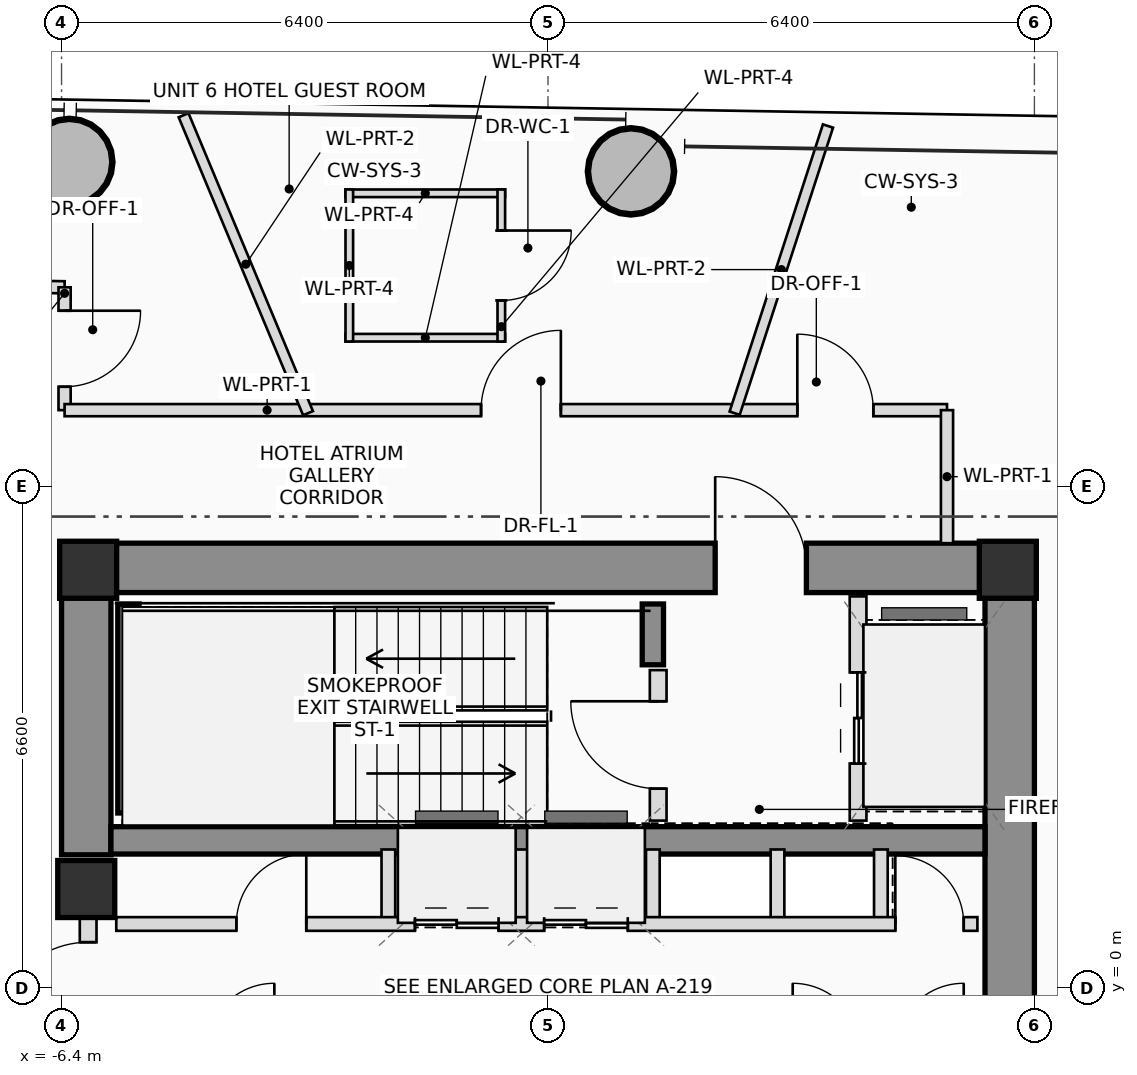
"""IFC4 building model, lengths in metres.
Left out: names, types, materials, properties, quantities, classifications, styles, units other than length and angle.
Written with IfcOpenShell. Run it as: python <this file> out.ifc"""

import sys

from ifc_helpers import new_model, si_unit, direction, frame, frame_2d, origin, origin_2d, place, context, subcontext, project, spatial, rectangle, hollow_circle, extrude, source, transform, mapped, element, fill, save


model = new_model("IFC4")
c1 = context("Model", 3, precision=1e-05, world=origin(), true_north=direction((0.0, 1.0)))
c2 = subcontext(c1, "Body", "Model", "MODEL_VIEW")
j1 = project(units=[si_unit("LENGTHUNIT", "METRE"), si_unit("PLANEANGLEUNIT", "RADIAN")], contexts=[c1])
p1 = place(None, origin())
s1 = spatial("IfcSite", under=j1, at=p1, CompositionType="ELEMENT")
p2 = place(p1, origin())
s2 = spatial("IfcBuilding", under=s1, at=p2, CompositionType="ELEMENT")
p3 = place(p2, frame((0.0, 0.0, 212.15)))
s3 = spatial("IfcBuildingStorey", under=s2, at=p3, CompositionType="ELEMENT", Elevation=212.15)
m1 = source(origin(), c2, "Body", "SweptSolid", [
    extrude(rectangle(XDim=0.75, YDim=0.75, at=origin_2d()), origin(), (0.0, 0.0, 1.0), 3.45),
])
for number, where, z_axis, x_axis in (
    (1, (6.05, 5.5, 0.0), (0.0, 0.0, 1.0), (1.0, 0.0, 0.0)),
    (2, (-6.05, 5.5, 0.0), (0.0, 0.0, 1.0), (1.0, 0.0, 0.0)),
):
    element("IfcColumn", number, at=place(p3, frame(where, z_axis=z_axis, x_axis=x_axis)), inside=s3, PredefinedType="COLUMN", context=c2, shape_type="MappedRepresentation", body=[
        mapped(m1, transform((0.0, 0.0, 0.0), scale=1.0)),
    ])
p4 = place(p3, frame((-6.4, 5.525, 0.0), z_axis=(0.0, 0.0, 1.0), x_axis=(1.0, 0.0, 0.0)))
e3 = element("IfcWall", 3, at=p4, inside=s3, PredefinedType="SHEAR", context=c2, shape_type="SweptSolid", body=[
    extrude(rectangle(XDim=12.8, YDim=0.65, at=frame_2d((6.4, 0.0))), origin(), (0.0, 0.0, 1.0), 3.45),
])
p5 = place(p4, frame((8.6, 0.0, 0.0)))
e4 = element("IfcOpeningElement", 4, at=p5, cuts=e3, PredefinedType="OPENING", context=c2, shape_type="SweptSolid", body=[
    extrude(rectangle(XDim=1.2, YDim=2.2, at=frame_2d((0.6, 1.1))), frame((0.0, 0.335, 0.0), z_axis=(0.0, -1.0, 0.0), x_axis=(1.0, 0.0, 0.0)), (0.0, 0.0, 1.0), 0.67),
])
p6 = place(p3, frame((6.075, -5.2, 0.0), z_axis=(0.0, 0.0, 1.0), x_axis=(0.0, 1.0, 0.0)))
e5 = element("IfcWall", 5, at=p6, inside=s3, PredefinedType="SHEAR", context=c2, shape_type="SweptSolid", body=[
    extrude(rectangle(XDim=10.4, YDim=0.65, at=frame_2d((5.2, 0.0))), origin(), (0.0, 0.0, 1.0), 3.45),
])
p7 = place(p3, frame((-6.075, 1.75, 0.0), z_axis=(0.0, 0.0, 1.0), x_axis=(0.0, 1.0, 0.0)))
e6 = element("IfcWall", 6, at=p7, inside=s3, PredefinedType="SHEAR", context=c2, shape_type="SweptSolid", body=[
    extrude(rectangle(XDim=3.45, YDim=0.65, at=frame_2d((1.725, 0.0))), origin(), (0.0, 0.0, 1.0), 3.45),
])
p8 = place(p3, frame((-5.75, 1.94, 0.0), z_axis=(0.0, 0.0, 1.0), x_axis=(1.0, 0.0, 0.0)))
e7 = element("IfcWall", 7, at=p8, inside=s3, PredefinedType="SHEAR", context=c2, shape_type="SweptSolid", body=[
    extrude(rectangle(XDim=11.5, YDim=0.36, at=frame_2d((5.75, 0.0))), origin(), (0.0, 0.0, 1.0), 3.45),
])
p9 = place(p3, frame((-5.52, 2.3, 0.0), z_axis=(0.0, 0.0, 1.0), x_axis=(0.0, 1.0, 0.0)))
e8 = element("IfcWall", 8, at=p9, inside=s3, PredefinedType="SHEAR", context=c2, shape_type="SweptSolid", body=[
    extrude(rectangle(XDim=2.75, YDim=0.28, at=frame_2d((1.375, 0.0))), origin(), (0.0, 0.0, 1.0), 3.45),
])
p10 = place(p3, frame((1.38, 4.25, 0.0), z_axis=(0.0, 0.0, 1.0), x_axis=(0.0, 1.0, 0.0)))
e9 = element("IfcWall", 9, at=p10, inside=s3, PredefinedType="SHEAR", context=c2, shape_type="SweptSolid", body=[
    extrude(rectangle(XDim=0.8, YDim=0.28, at=frame_2d((0.4, 0.0))), origin(), (0.0, 0.0, 1.0), 3.45),
])
p11 = place(p3, frame((-6.075, 1.3, 0.0), z_axis=(0.0, 0.0, 1.0), x_axis=(1.0, 0.0, 0.0)))
e10 = element("IfcColumn", 10, at=p11, inside=s3, PredefinedType="COLUMN", context=c2, shape_type="MappedRepresentation", body=[
    mapped(m1, transform((0.0, 0.0, 0.0), scale=1.0)),
])
m2 = source(origin(), c2, "Body", "SweptSolid", [
    extrude(hollow_circle(Radius=0.575, WallThickness=0.042, at=origin_2d()), origin(), (0.0, 0.0, 1.0), 3.45),
])
for number, where, z_axis, x_axis in (
    (11, (1.092, 10.742, 0.0), (0.0, 0.0, 1.0), (1.0, 0.0, 0.0)),
    (12, (-6.298, 10.865, 0.0), (0.0, 0.0, 1.0), (1.0, 0.0, 0.0)),
):
    element("IfcColumn", number, at=place(p3, frame(where, z_axis=z_axis, x_axis=x_axis)), inside=s3, PredefinedType="COLUMN", context=c2, shape_type="MappedRepresentation", body=[
        mapped(m2, transform((0.0, 0.0, 0.0), scale=1.0)),
    ])
p12 = place(p3, frame((-6.05, -0.95, 0.0), z_axis=(0.0, 0.0, 1.0), x_axis=(0.0, 1.0, 0.0)))
e13 = element("IfcWall", 13, at=p12, inside=s3, PredefinedType="PLUMBINGWALL", context=c2, shape_type="SweptSolid", body=[
    extrude(rectangle(XDim=1.9, YDim=0.22, at=frame_2d((0.95, 0.0))), origin(), (0.0, 0.0, 1.0), 2.23),
])
p13 = place(p12, frame((0.35, 0.0, 0.0)))
e14 = element("IfcOpeningElement", 14, at=p13, cuts=e13, PredefinedType="OPENING", context=c2, shape_type="SweptSolid", body=[
    extrude(rectangle(XDim=1.2, YDim=2.2, at=frame_2d((0.6, 1.1))), frame((0.0, 0.12, 0.0), z_axis=(0.0, -1.0, 0.0), x_axis=(1.0, 0.0, 0.0)), (0.0, 0.0, 1.0), 0.24),
])
p14 = place(p3, frame((1.45, 2.2, 0.0), z_axis=(0.0, 0.0, 1.0), x_axis=(0.0, 1.0, 0.0)))
e15 = element("IfcWall", 15, at=p14, inside=s3, PredefinedType="PLUMBINGWALL", context=c2, shape_type="SweptSolid", body=[
    extrude(rectangle(XDim=1.98, YDim=0.22, at=frame_2d((0.99, 0.0))), origin(), (0.0, 0.0, 1.0), 3.25),
])
p15 = place(p14, frame((0.42, 0.0, 0.0)))
e16 = element("IfcOpeningElement", 16, at=p15, cuts=e15, PredefinedType="OPENING", context=c2, shape_type="SweptSolid", body=[
    extrude(rectangle(XDim=1.15, YDim=2.15, at=frame_2d((0.575, 1.075))), frame((0.0, 0.12, 0.0), z_axis=(0.0, -1.0, 0.0), x_axis=(1.0, 0.0, 0.0)), (0.0, 0.0, 1.0), 0.24),
])
p16 = place(p3, frame((4.08, 2.2, 0.0), z_axis=(0.0, 0.0, 1.0), x_axis=(0.0, 1.0, 0.0)))
e17 = element("IfcWall", 17, at=p16, inside=s3, PredefinedType="PLUMBINGWALL", context=c2, shape_type="SweptSolid", body=[
    extrude(rectangle(XDim=2.95, YDim=0.22, at=frame_2d((1.475, 0.0))), origin(), (0.0, 0.0, 1.0), 3.25),
])
p17 = place(p16, frame((0.75, 0.0, 0.0)))
e18 = element("IfcOpeningElement", 18, at=p17, cuts=e17, PredefinedType="OPENING", context=c2, shape_type="SweptSolid", body=[
    extrude(rectangle(XDim=1.2, YDim=2.25, at=frame_2d((0.6, 1.125))), frame((0.0, 0.12, 0.0), z_axis=(0.0, -1.0, 0.0), x_axis=(1.0, 0.0, 0.0)), (0.0, 0.0, 1.0), 0.24),
])
for number, where, z_axis, x_axis in (
    (19, (-2.1, 0.84, 0.0), (0.0, 0.0, 1.0), (0.0, 1.0, 0.0)),
    (20, (-0.35, 0.84, 0.0), (0.0, 0.0, 1.0), (0.0, 1.0, 0.0)),
    (21, (1.38, 0.84, 0.0), (0.0, 0.0, 1.0), (0.0, 1.0, 0.0)),
    (22, (3.02, 0.84, 0.0), (0.0, 0.0, 1.0), (0.0, 1.0, 0.0)),
    (23, (4.38, 0.84, 0.0), (0.0, 0.0, 1.0), (0.0, 1.0, 0.0)),
):
    element("IfcWall", number, at=place(p3, frame(where, z_axis=z_axis, x_axis=x_axis)), inside=s3, PredefinedType="PLUMBINGWALL", context=c2, shape_type="SweptSolid", body=[
        extrude(rectangle(XDim=0.98, YDim=0.18, at=frame_2d((0.49, 0.0))), origin(), (0.0, 0.0, 1.0), 3.25),
    ])
p18 = place(p3, frame((-5.68, 0.84, 0.0), z_axis=(0.0, 0.0, 1.0), x_axis=(1.0, 0.0, 0.0)))
e24 = element("IfcWall", 24, at=p18, inside=s3, PredefinedType="PLUMBINGWALL", context=c2, shape_type="SweptSolid", body=[
    extrude(rectangle(XDim=11.33, YDim=0.18, at=frame_2d((5.665, 0.0))), origin(), (0.0, 0.0, 1.0), 3.25),
])
p19 = place(p18, frame((1.58, 0.0, 0.0)))
e25 = element("IfcOpeningElement", 25, at=p19, cuts=e24, PredefinedType="OPENING", context=c2, shape_type="SweptSolid", body=[
    extrude(rectangle(XDim=0.92, YDim=2.1, at=frame_2d((0.46, 1.05))), frame((0.0, 0.1, 0.0), z_axis=(0.0, -1.0, 0.0), x_axis=(1.0, 0.0, 0.0)), (0.0, 0.0, 1.0), 0.2),
])
p20 = place(p18, frame((3.93, 0.0, 0.0)))
e26 = element("IfcOpeningElement", 26, at=p20, cuts=e24, PredefinedType="OPENING", context=c2, shape_type="SweptSolid", body=[
    extrude(rectangle(XDim=1.1, YDim=2.2, at=frame_2d((0.55, 1.1))), frame((0.0, 0.1, 0.0), z_axis=(0.0, -1.0, 0.0), x_axis=(1.0, 0.0, 0.0)), (0.0, 0.0, 1.0), 0.2),
])
p21 = place(p18, frame((5.63, 0.0, 0.0)))
e27 = element("IfcOpeningElement", 27, at=p21, cuts=e24, PredefinedType="OPENING", context=c2, shape_type="SweptSolid", body=[
    extrude(rectangle(XDim=1.1, YDim=2.2, at=frame_2d((0.55, 1.1))), frame((0.0, 0.1, 0.0), z_axis=(0.0, -1.0, 0.0), x_axis=(1.0, 0.0, 0.0)), (0.0, 0.0, 1.0), 0.2),
])
p22 = place(p18, frame((10.25, 0.0, 0.0)))
e28 = element("IfcOpeningElement", 28, at=p22, cuts=e24, PredefinedType="OPENING", context=c2, shape_type="SweptSolid", body=[
    extrude(rectangle(XDim=0.9, YDim=2.05, at=frame_2d((0.45, 1.025))), frame((0.0, 0.1, 0.0), z_axis=(0.0, -1.0, 0.0), x_axis=(1.0, 0.0, 0.0)), (0.0, 0.0, 1.0), 0.2),
])
for number, where, z_axis, x_axis in (
    (29, (-2.664, 10.453, 0.0), (0.0, 0.0, 1.0), (1.0, 0.0, 0.0)),
    (30, (-0.564, 8.553, 0.0), (0.0, 0.0, 1.0), (-1.0, 0.0, 0.0)),
):
    element("IfcWall", number, at=place(p3, frame(where, z_axis=z_axis, x_axis=x_axis)), inside=s3, PredefinedType="PARTITIONING", context=c2, shape_type="SweptSolid", body=[
        extrude(rectangle(XDim=2.1, YDim=0.1, at=frame_2d((1.05, 0.0))), origin(), (0.0, 0.0, 1.0), 3.25),
    ])
p23 = place(p3, frame((-0.614, 10.503, 0.0), z_axis=(0.0, 0.0, 1.0), x_axis=(0.0, -1.0, 0.0)))
e31 = element("IfcWall", 31, at=p23, inside=s3, PredefinedType="PARTITIONING", context=c2, shape_type="SweptSolid", body=[
    extrude(rectangle(XDim=2.0, YDim=0.1, at=frame_2d((1.0, 0.0))), origin(), (0.0, 0.0, 1.0), 2.905),
])
p24 = place(p23, frame((0.54, 0.0, 0.0)))
e32 = element("IfcOpeningElement", 32, at=p24, cuts=e31, PredefinedType="OPENING", context=c2, shape_type="SweptSolid", body=[
    extrude(rectangle(XDim=0.92, YDim=2.1, at=frame_2d((0.46, 1.05))), frame((0.0, 0.06, 0.0), z_axis=(0.0, -1.0, 0.0), x_axis=(1.0, 0.0, 0.0)), (0.0, 0.0, 1.0), 0.12),
])
p25 = place(p3, frame((-2.614, 8.503, 0.0), z_axis=(0.0, 0.0, 1.0), x_axis=(0.0, 1.0, 0.0)))
e33 = element("IfcWall", 33, at=p25, inside=s3, PredefinedType="PARTITIONING", context=c2, shape_type="SweptSolid", body=[
    extrude(rectangle(XDim=2.0, YDim=0.1, at=frame_2d((1.0, 0.0))), origin(), (0.0, 0.0, 1.0), 2.905),
])
p26 = place(p3, frame((-8.15, 9.246, 0.0), z_axis=(0.0, 0.0, 1.0), x_axis=(0.999859277964, -0.016775704705, 0.0)))
e34 = element("IfcWall", 34, at=p26, inside=s3, PredefinedType="PARTITIONING", context=c2, shape_type="SweptSolid", body=[
    extrude(rectangle(XDim=1.79, YDim=0.16, at=frame_2d((0.895, 0.0))), origin(), (0.0, 0.0, 1.0), 2.905),
])
p27 = place(p3, frame((-6.36, 9.216, 0.0), z_axis=(0.0, 0.0, 1.0), x_axis=(0.0, -1.0, 0.0)))
e35 = element("IfcWall", 35, at=p27, inside=s3, PredefinedType="PARTITIONING", context=c2, shape_type="SweptSolid", body=[
    extrude(rectangle(XDim=1.616, YDim=0.16, at=frame_2d((0.808, 0.0))), origin(), (0.0, 0.0, 1.0), 2.605),
])
p28 = place(p27, frame((0.308, 0.0, 0.0)))
e36 = element("IfcOpeningElement", 36, at=p28, cuts=e35, PredefinedType="OPENING", context=c2, shape_type="SweptSolid", body=[
    extrude(rectangle(XDim=1.0, YDim=2.25, at=frame_2d((0.5, 1.125))), frame((0.0, 0.09, 0.0), z_axis=(0.0, -1.0, 0.0), x_axis=(1.0, 0.0, 0.0)), (0.0, 0.0, 1.0), 0.18),
])
p29 = place(p3, frame((-6.36, 7.6, 0.0), z_axis=(0.0, 0.0, 1.0), x_axis=(1.0, 0.0, 0.0)))
e37 = element("IfcWall", 37, at=p29, inside=s3, PredefinedType="PARTITIONING", context=c2, shape_type="SweptSolid", body=[
    extrude(rectangle(XDim=11.61, YDim=0.16, at=frame_2d((5.805, 0.0))), origin(), (0.0, 0.0, 1.0), 2.605),
])
p30 = place(p29, frame((5.479, 0.0, 0.0)))
e38 = element("IfcOpeningElement", 38, at=p30, cuts=e37, PredefinedType="OPENING", context=c2, shape_type="SweptSolid", body=[
    extrude(rectangle(XDim=1.05, YDim=2.2, at=frame_2d((0.525, 1.1))), frame((0.0, 0.09, 0.0), z_axis=(0.0, -1.0, 0.0), x_axis=(1.0, 0.0, 0.0)), (0.0, 0.0, 1.0), 0.18),
])
p31 = place(p29, frame((9.641, 0.0, 0.0)))
e39 = element("IfcOpeningElement", 39, at=p31, cuts=e37, PredefinedType="OPENING", context=c2, shape_type="SweptSolid", body=[
    extrude(rectangle(XDim=1.0, YDim=2.25, at=frame_2d((0.5, 1.125))), frame((0.0, 0.09, 0.0), z_axis=(0.0, -1.0, 0.0), x_axis=(1.0, 0.0, 0.0)), (0.0, 0.0, 1.0), 0.18),
])
p32 = place(p3, frame((5.25, 7.6, 0.0), z_axis=(0.0, 0.0, 1.0), x_axis=(0.0, -1.0, 0.0)))
e40 = element("IfcWall", 40, at=p32, inside=s3, PredefinedType="PARTITIONING", context=c2, shape_type="SweptSolid", body=[
    extrude(rectangle(XDim=1.75, YDim=0.16, at=frame_2d((0.875, 0.0))), origin(), (0.0, 0.0, 1.0), 2.605),
])
p33 = place(p3, frame((2.456, 7.56, 0.0), z_axis=(0.0, 0.0, 1.0), x_axis=(0.30904716458, 0.951046712872, 0.0)))
e41 = element("IfcWall", 41, at=p33, inside=s3, PredefinedType="PARTITIONING", context=c2, shape_type="SweptSolid", body=[
    extrude(rectangle(XDim=3.973, YDim=0.14, at=frame_2d((1.986, 0.0))), origin(), (0.0, 0.0, 1.0), 2.605),
])
p34 = place(p3, frame((-3.157, 7.56, 0.0), z_axis=(0.0, 0.0, 1.0), x_axis=(-0.38535788012, 0.922767199368, 0.0)))
e42 = element("IfcWall", 42, at=p34, inside=s3, PredefinedType="PARTITIONING", context=c2, shape_type="SweptSolid", body=[
    extrude(rectangle(XDim=4.249, YDim=0.14, at=frame_2d((2.124, 0.0))), origin(), (0.0, 0.0, 1.0), 2.765),
])
p35 = place(p5, origin())
e43 = element("IfcDoor", 43, at=p35, inside=s3, OperationType="SINGLE_SWING_LEFT", PredefinedType="DOOR", context=c2, shape_type="SweptSolid", body=[
    extrude(rectangle(XDim=1.2, YDim=2.2, at=frame_2d((0.6, 1.1))), frame((0.0, 0.025, 0.0), z_axis=(0.0, -1.0, 0.0), x_axis=(1.0, 0.0, 0.0)), (0.0, 0.0, 1.0), 0.05),
])
fill(e4, e43)
p36 = place(p13, origin())
e44 = element("IfcDoor", 44, at=p36, inside=s3, OperationType="SINGLE_SWING_LEFT", PredefinedType="DOOR", context=c2, shape_type="SweptSolid", body=[
    extrude(rectangle(XDim=1.2, YDim=2.2, at=frame_2d((0.6, 1.1))), frame((0.0, 0.025, 0.0), z_axis=(0.0, -1.0, 0.0), x_axis=(1.0, 0.0, 0.0)), (0.0, 0.0, 1.0), 0.05),
])
fill(e14, e44)
p37 = place(p15, origin())
e45 = element("IfcDoor", 45, at=p37, inside=s3, OperationType="SINGLE_SWING_RIGHT", PredefinedType="DOOR", context=c2, shape_type="SweptSolid", body=[
    extrude(rectangle(XDim=1.15, YDim=2.15, at=frame_2d((0.575, 1.075))), frame((0.0, 0.025, 0.0), z_axis=(0.0, -1.0, 0.0), x_axis=(1.0, 0.0, 0.0)), (0.0, 0.0, 1.0), 0.05),
])
fill(e16, e45)
p38 = place(p17, origin())
e46 = element("IfcDoor", 46, at=p38, inside=s3, OperationType="DOUBLE_DOOR_SLIDING", PredefinedType="DOOR", context=c2, shape_type="SweptSolid", body=[
    extrude(rectangle(XDim=1.2, YDim=2.25, at=frame_2d((0.6, 1.125))), frame((0.0, 0.025, 0.0), z_axis=(0.0, -1.0, 0.0), x_axis=(1.0, 0.0, 0.0)), (0.0, 0.0, 1.0), 0.05),
])
fill(e18, e46)
p39 = place(p19, origin())
e47 = element("IfcDoor", 47, at=p39, inside=s3, OperationType="SINGLE_SWING_RIGHT", PredefinedType="DOOR", context=c2, shape_type="SweptSolid", body=[
    extrude(rectangle(XDim=0.92, YDim=2.1, at=frame_2d((0.46, 1.05))), frame((0.0, 0.025, 0.0), z_axis=(0.0, -1.0, 0.0), x_axis=(1.0, 0.0, 0.0)), (0.0, 0.0, 1.0), 0.05),
])
fill(e25, e47)
p40 = place(p20, origin())
e48 = element("IfcDoor", 48, at=p40, inside=s3, OperationType="DOUBLE_DOOR_SLIDING", PredefinedType="DOOR", context=c2, shape_type="SweptSolid", body=[
    extrude(rectangle(XDim=1.1, YDim=2.2, at=frame_2d((0.55, 1.1))), frame((0.0, 0.025, 0.0), z_axis=(0.0, -1.0, 0.0), x_axis=(1.0, 0.0, 0.0)), (0.0, 0.0, 1.0), 0.05),
])
fill(e26, e48)
p41 = place(p21, origin())
e49 = element("IfcDoor", 49, at=p41, inside=s3, OperationType="DOUBLE_DOOR_SLIDING", PredefinedType="DOOR", context=c2, shape_type="SweptSolid", body=[
    extrude(rectangle(XDim=1.1, YDim=2.2, at=frame_2d((0.55, 1.1))), frame((0.0, 0.025, 0.0), z_axis=(0.0, -1.0, 0.0), x_axis=(1.0, 0.0, 0.0)), (0.0, 0.0, 1.0), 0.05),
])
fill(e27, e49)
p42 = place(p22, origin())
e50 = element("IfcDoor", 50, at=p42, inside=s3, OperationType="SINGLE_SWING_LEFT", PredefinedType="DOOR", context=c2, shape_type="SweptSolid", body=[
    extrude(rectangle(XDim=0.9, YDim=2.05, at=frame_2d((0.45, 1.025))), frame((0.0, 0.025, 0.0), z_axis=(0.0, -1.0, 0.0), x_axis=(1.0, 0.0, 0.0)), (0.0, 0.0, 1.0), 0.05),
])
fill(e28, e50)
p43 = place(p24, origin())
e51 = element("IfcDoor", 51, at=p43, inside=s3, OperationType="SINGLE_SWING_LEFT", PredefinedType="DOOR", context=c2, shape_type="SweptSolid", body=[
    extrude(rectangle(XDim=0.92, YDim=2.1, at=frame_2d((0.46, 1.05))), frame((0.0, 0.025, 0.0), z_axis=(0.0, -1.0, 0.0), x_axis=(1.0, 0.0, 0.0)), (0.0, 0.0, 1.0), 0.05),
])
fill(e32, e51)
p44 = place(p28, origin())
e52 = element("IfcDoor", 52, at=p44, inside=s3, OperationType="SINGLE_SWING_LEFT", PredefinedType="DOOR", context=c2, shape_type="SweptSolid", body=[
    extrude(rectangle(XDim=1.0, YDim=2.25, at=frame_2d((0.5, 1.125))), frame((0.0, 0.025, 0.0), z_axis=(0.0, -1.0, 0.0), x_axis=(1.0, 0.0, 0.0)), (0.0, 0.0, 1.0), 0.05),
])
fill(e36, e52)
p45 = place(p30, origin())
e53 = element("IfcDoor", 53, at=p45, inside=s3, OperationType="SINGLE_SWING_RIGHT", PredefinedType="DOOR", context=c2, shape_type="SweptSolid", body=[
    extrude(rectangle(XDim=1.05, YDim=2.2, at=frame_2d((0.525, 1.1))), frame((0.0, 0.025, 0.0), z_axis=(0.0, -1.0, 0.0), x_axis=(1.0, 0.0, 0.0)), (0.0, 0.0, 1.0), 0.05),
])
fill(e38, e53)
p46 = place(p31, origin())
e54 = element("IfcDoor", 54, at=p46, inside=s3, OperationType="SINGLE_SWING_LEFT", PredefinedType="DOOR", context=c2, shape_type="SweptSolid", body=[
    extrude(rectangle(XDim=1.0, YDim=2.25, at=frame_2d((0.5, 1.125))), frame((0.0, 0.025, 0.0), z_axis=(0.0, -1.0, 0.0), x_axis=(1.0, 0.0, 0.0)), (0.0, 0.0, 1.0), 0.05),
])
fill(e39, e54)
save(model, sys.argv[1])
